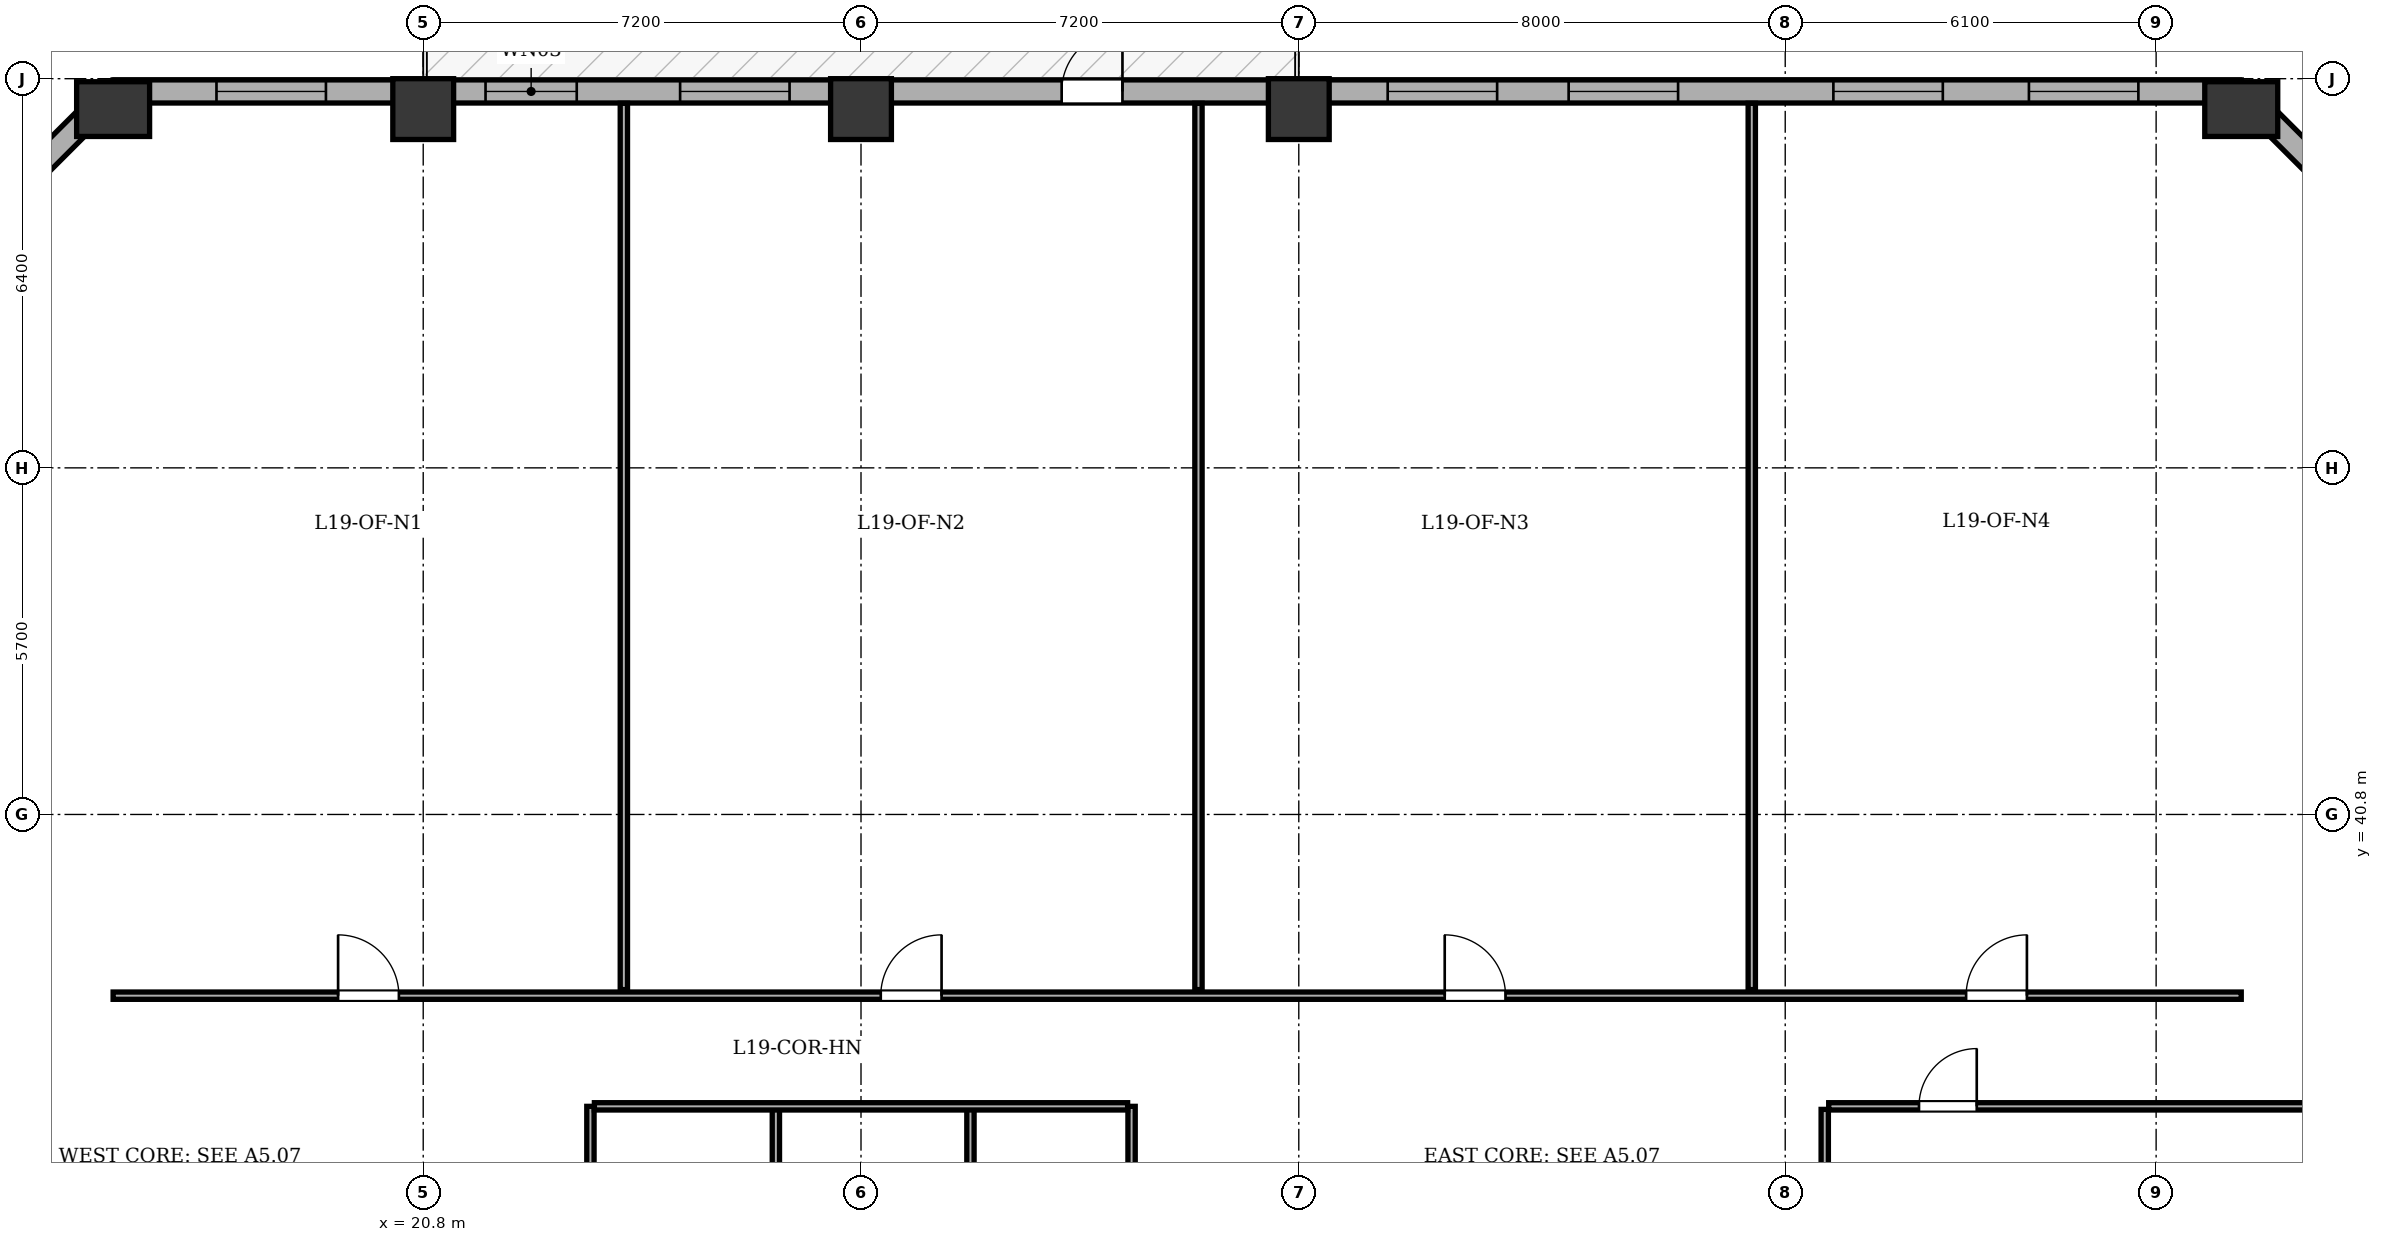
"""IFC4 building model, lengths in metres.
Left out: names, types, materials, properties, quantities, classifications, styles, units other than length and angle.
Written with IfcOpenShell. Run it as: python <this file> out.ifc"""

import sys

from ifc_helpers import new_model, si_unit, direction, frame, frame_2d, origin, origin_2d, place, context, subcontext, project, spatial, rectangle, extrude, element, fill, save


model = new_model("IFC4")
c1 = context("Model", 3, precision=1e-05, world=origin(), true_north=direction((0.0, 1.0)))
c2 = subcontext(c1, "Body", "Model", "MODEL_VIEW")
j1 = project(units=[si_unit("LENGTHUNIT", "METRE"), si_unit("PLANEANGLEUNIT", "RADIAN")], contexts=[c1])
p1 = place(None, origin())
s1 = spatial("IfcSite", under=j1, at=p1, CompositionType="ELEMENT")
p2 = place(p1, origin())
s2 = spatial("IfcBuilding", under=s1, at=p2, CompositionType="ELEMENT")
p3 = place(p2, frame((0.0, 0.0, 78.9)))
s3 = spatial("IfcBuildingStorey", under=s2, at=p3, CompositionType="ELEMENT", Elevation=78.9)
p4 = place(p3, frame((15.7, 52.4, 0.0), z_axis=(0.0, 0.0, 1.0), x_axis=(1.0, 0.0, 0.0)))
e1 = element("IfcColumn", 1, at=p4, inside=s3, PredefinedType="COLUMN", context=c2, shape_type="SweptSolid", body=[
    extrude(rectangle(XDim=0.9, YDim=1.2, at=origin_2d()), origin(), (0.0, 0.0, 1.0), 3.9),
])
for number, where, z_axis, x_axis in (
    (2, (20.8, 52.4, 0.0), (0.0, 0.0, 1.0), (1.0, 0.0, 0.0)),
    (3, (28.0, 52.4, 0.0), (0.0, 0.0, 1.0), (1.0, 0.0, 0.0)),
    (4, (35.2, 52.4, 0.0), (0.0, 0.0, 1.0), (1.0, 0.0, 0.0)),
):
    element("IfcColumn", number, at=place(p3, frame(where, z_axis=z_axis, x_axis=x_axis)), inside=s3, PredefinedType="COLUMN", context=c2, shape_type="SweptSolid", body=[
        extrude(rectangle(XDim=1.0, YDim=1.0, at=origin_2d()), origin(), (0.0, 0.0, 1.0), 3.9),
    ])
p5 = place(p3, frame((50.7, 52.4, 0.0), z_axis=(0.0, 0.0, 1.0), x_axis=(1.0, 0.0, 0.0)))
e5 = element("IfcColumn", 5, at=p5, inside=s3, PredefinedType="COLUMN", context=c2, shape_type="SweptSolid", body=[
    extrude(rectangle(XDim=0.9, YDim=1.2, at=origin_2d()), origin(), (0.0, 0.0, 1.0), 3.9),
])
p6 = place(p3, frame((10.91, 47.9, 0.0), z_axis=(0.0, 0.0, 1.0), x_axis=(0.707106781187, 0.707106781187, 0.0)))
e6 = element("IfcWall", 6, at=p6, inside=s3, PredefinedType="STANDARD", context=c2, shape_type="SweptSolid", body=[
    extrude(rectangle(XDim=6.774, YDim=0.38, at=frame_2d((3.387, 0.0))), origin(), (0.0, 0.0, 1.0), 3.135),
])
p7 = place(p6, frame((2.687, 0.0, 0.8)))
e7 = element("IfcOpeningElement", 7, at=p7, cuts=e6, PredefinedType="OPENING", context=c2, shape_type="SweptSolid", body=[
    extrude(rectangle(XDim=1.4, YDim=1.65, at=frame_2d((0.7, 0.825))), frame((0.0, 0.2, 0.0), z_axis=(0.0, -1.0, 0.0), x_axis=(1.0, 0.0, 0.0)), (0.0, 0.0, 1.0), 0.4),
])
p8 = place(p3, frame((15.7, 52.69, 0.0), z_axis=(0.0, 0.0, 1.0), x_axis=(1.0, 0.0, 0.0)))
e8 = element("IfcWall", 8, at=p8, inside=s3, PredefinedType="STANDARD", context=c2, shape_type="SweptSolid", body=[
    extrude(rectangle(XDim=35.0, YDim=0.38, at=frame_2d((17.5, 0.0))), origin(), (0.0, 0.0, 1.0), 3.135),
])
p9 = place(p8, frame((15.6, 0.0, 0.0)))
e9 = element("IfcOpeningElement", 9, at=p9, cuts=e8, PredefinedType="OPENING", context=c2, shape_type="SweptSolid", body=[
    extrude(rectangle(XDim=1.0, YDim=2.02, at=frame_2d((0.5, 1.01))), frame((0.0, 0.2, 0.0), z_axis=(0.0, -1.0, 0.0), x_axis=(1.0, 0.0, 0.0)), (0.0, 0.0, 1.0), 0.4),
])
p10 = place(p8, frame((1.7, 0.0, 0.8)))
e10 = element("IfcOpeningElement", 10, at=p10, cuts=e8, PredefinedType="OPENING", context=c2, shape_type="SweptSolid", body=[
    extrude(rectangle(XDim=1.8, YDim=1.9, at=frame_2d((0.9, 0.95))), frame((0.0, 0.2, 0.0), z_axis=(0.0, -1.0, 0.0), x_axis=(1.0, 0.0, 0.0)), (0.0, 0.0, 1.0), 0.4),
])
p11 = place(p8, frame((6.125, 0.0, 0.8)))
e11 = element("IfcOpeningElement", 11, at=p11, cuts=e8, PredefinedType="OPENING", context=c2, shape_type="SweptSolid", body=[
    extrude(rectangle(XDim=1.5, YDim=1.9, at=frame_2d((0.75, 0.95))), frame((0.0, 0.2, 0.0), z_axis=(0.0, -1.0, 0.0), x_axis=(1.0, 0.0, 0.0)), (0.0, 0.0, 1.0), 0.4),
])
p12 = place(p8, frame((9.325, 0.0, 0.8)))
e12 = element("IfcOpeningElement", 12, at=p12, cuts=e8, PredefinedType="OPENING", context=c2, shape_type="SweptSolid", body=[
    extrude(rectangle(XDim=1.8, YDim=1.9, at=frame_2d((0.9, 0.95))), frame((0.0, 0.2, 0.0), z_axis=(0.0, -1.0, 0.0), x_axis=(1.0, 0.0, 0.0)), (0.0, 0.0, 1.0), 0.4),
])
p13 = place(p8, frame((20.962, 0.0, 0.8)))
e13 = element("IfcOpeningElement", 13, at=p13, cuts=e8, PredefinedType="OPENING", context=c2, shape_type="SweptSolid", body=[
    extrude(rectangle(XDim=1.8, YDim=1.9, at=frame_2d((0.9, 0.95))), frame((0.0, 0.2, 0.0), z_axis=(0.0, -1.0, 0.0), x_axis=(1.0, 0.0, 0.0)), (0.0, 0.0, 1.0), 0.4),
])
p14 = place(p8, frame((23.938, 0.0, 0.8)))
e14 = element("IfcOpeningElement", 14, at=p14, cuts=e8, PredefinedType="OPENING", context=c2, shape_type="SweptSolid", body=[
    extrude(rectangle(XDim=1.8, YDim=1.9, at=frame_2d((0.9, 0.95))), frame((0.0, 0.2, 0.0), z_axis=(0.0, -1.0, 0.0), x_axis=(1.0, 0.0, 0.0)), (0.0, 0.0, 1.0), 0.4),
])
p15 = place(p8, frame((28.292, 0.0, 0.8)))
e15 = element("IfcOpeningElement", 15, at=p15, cuts=e8, PredefinedType="OPENING", context=c2, shape_type="SweptSolid", body=[
    extrude(rectangle(XDim=1.8, YDim=1.9, at=frame_2d((0.9, 0.95))), frame((0.0, 0.2, 0.0), z_axis=(0.0, -1.0, 0.0), x_axis=(1.0, 0.0, 0.0)), (0.0, 0.0, 1.0), 0.4),
])
p16 = place(p8, frame((31.508, 0.0, 0.8)))
e16 = element("IfcOpeningElement", 16, at=p16, cuts=e8, PredefinedType="OPENING", context=c2, shape_type="SweptSolid", body=[
    extrude(rectangle(XDim=1.8, YDim=1.9, at=frame_2d((0.9, 0.95))), frame((0.0, 0.2, 0.0), z_axis=(0.0, -1.0, 0.0), x_axis=(1.0, 0.0, 0.0)), (0.0, 0.0, 1.0), 0.4),
])
p17 = place(p3, frame((50.7, 52.69, 0.0), z_axis=(0.0, 0.0, 1.0), x_axis=(0.707106781187, -0.707106781187, 0.0)))
e17 = element("IfcWall", 17, at=p17, inside=s3, PredefinedType="STANDARD", context=c2, shape_type="SweptSolid", body=[
    extrude(rectangle(XDim=6.774, YDim=0.38, at=frame_2d((3.387, 0.0))), origin(), (0.0, 0.0, 1.0), 3.135),
])
p18 = place(p17, frame((2.687, 0.0, 0.8)))
e18 = element("IfcOpeningElement", 18, at=p18, cuts=e17, PredefinedType="OPENING", context=c2, shape_type="SweptSolid", body=[
    extrude(rectangle(XDim=1.4, YDim=1.65, at=frame_2d((0.7, 0.825))), frame((0.0, 0.2, 0.0), z_axis=(0.0, -1.0, 0.0), x_axis=(1.0, 0.0, 0.0)), (0.0, 0.0, 1.0), 0.4),
])
for number, where, z_axis, x_axis in (
    (19, (23.55, 24.715, 0.0), (0.0, 0.0, 1.0), (0.0, 1.0, 0.0)),
    (20, (32.45, 24.715, 0.0), (0.0, 0.0, 1.0), (0.0, 1.0, 0.0)),
    (21, (26.6, 24.715, 0.0), (0.0, 0.0, 1.0), (0.0, 1.0, 0.0)),
):
    element("IfcWall", number, at=place(p3, frame(where, z_axis=z_axis, x_axis=x_axis)), inside=s3, PredefinedType="PARTITIONING", context=c2, shape_type="SweptSolid", body=[
        extrude(rectangle(XDim=11.285, YDim=0.12, at=frame_2d((5.643, 0.0))), origin(), (0.0, 0.0, 1.0), 3.6),
    ])
p19 = place(p3, frame((29.8, 24.715, 0.0), z_axis=(0.0, 0.0, 1.0), x_axis=(0.0, 1.0, 0.0)))
e22 = element("IfcWall", 22, at=p19, inside=s3, PredefinedType="PARTITIONING", context=c2, shape_type="SweptSolid", body=[
    extrude(rectangle(XDim=11.285, YDim=0.12, at=frame_2d((5.643, 0.0))), origin(), (0.0, 0.0, 1.0), 3.135),
])
p20 = place(p3, frame((23.615, 36.0, 0.0), z_axis=(0.0, 0.0, 1.0), x_axis=(1.0, 0.0, 0.0)))
e23 = element("IfcWall", 23, at=p20, inside=s3, PredefinedType="PARTITIONING", context=c2, shape_type="SweptSolid", body=[
    extrude(rectangle(XDim=8.77, YDim=0.12, at=frame_2d((4.385, 0.0))), origin(), (0.0, 0.0, 1.0), 3.6),
])
p21 = place(p3, frame((15.7, 37.82, 0.0), z_axis=(0.0, 0.0, 1.0), x_axis=(1.0, 0.0, 0.0)))
e24 = element("IfcWall", 24, at=p21, inside=s3, PredefinedType="PARTITIONING", context=c2, shape_type="SweptSolid", body=[
    extrude(rectangle(XDim=35.0, YDim=0.12, at=frame_2d((17.5, 0.0))), origin(), (0.0, 0.0, 1.0), 3.6),
])
p22 = place(p21, frame((3.7, 0.0, 0.0)))
e25 = element("IfcOpeningElement", 25, at=p22, cuts=e24, PredefinedType="OPENING", context=c2, shape_type="SweptSolid", body=[
    extrude(rectangle(XDim=1.0, YDim=2.1, at=frame_2d((0.5, 1.05))), frame((0.0, 0.07, 0.0), z_axis=(0.0, -1.0, 0.0), x_axis=(1.0, 0.0, 0.0)), (0.0, 0.0, 1.0), 0.14),
])
p23 = place(p21, frame((12.625, 0.0, 0.0)))
e26 = element("IfcOpeningElement", 26, at=p23, cuts=e24, PredefinedType="OPENING", context=c2, shape_type="SweptSolid", body=[
    extrude(rectangle(XDim=1.0, YDim=2.1, at=frame_2d((0.5, 1.05))), frame((0.0, 0.07, 0.0), z_axis=(0.0, -1.0, 0.0), x_axis=(1.0, 0.0, 0.0)), (0.0, 0.0, 1.0), 0.14),
])
p24 = place(p21, frame((21.9, 0.0, 0.0)))
e27 = element("IfcOpeningElement", 27, at=p24, cuts=e24, PredefinedType="OPENING", context=c2, shape_type="SweptSolid", body=[
    extrude(rectangle(XDim=1.0, YDim=2.1, at=frame_2d((0.5, 1.05))), frame((0.0, 0.07, 0.0), z_axis=(0.0, -1.0, 0.0), x_axis=(1.0, 0.0, 0.0)), (0.0, 0.0, 1.0), 0.14),
])
p25 = place(p21, frame((30.475, 0.0, 0.0)))
e28 = element("IfcOpeningElement", 28, at=p25, cuts=e24, PredefinedType="OPENING", context=c2, shape_type="SweptSolid", body=[
    extrude(rectangle(XDim=1.0, YDim=2.1, at=frame_2d((0.5, 1.05))), frame((0.0, 0.07, 0.0), z_axis=(0.0, -1.0, 0.0), x_axis=(1.0, 0.0, 0.0)), (0.0, 0.0, 1.0), 0.14),
])
for number, where, z_axis, x_axis in (
    (29, (24.1, 37.92, 0.0), (0.0, 0.0, 1.0), (0.0, 1.0, 0.0)),
    (30, (33.55, 37.92, 0.0), (0.0, 0.0, 1.0), (0.0, 1.0, 0.0)),
):
    element("IfcWall", number, at=place(p3, frame(where, z_axis=z_axis, x_axis=x_axis)), inside=s3, PredefinedType="PARTITIONING", context=c2, shape_type="SweptSolid", body=[
        extrude(rectangle(XDim=14.575, YDim=0.12, at=frame_2d((7.288, 0.0))), origin(), (0.0, 0.0, 1.0), 3.135),
    ])
p26 = place(p3, frame((42.65, 37.92, 0.0), z_axis=(0.0, 0.0, 1.0), x_axis=(0.0, 1.0, 0.0)))
e31 = element("IfcWall", 31, at=p26, inside=s3, PredefinedType="PARTITIONING", context=c2, shape_type="SweptSolid", body=[
    extrude(rectangle(XDim=14.575, YDim=0.12, at=frame_2d((7.288, 0.0))), origin(), (0.0, 0.0, 1.0), 3.6),
])
p27 = place(p3, frame((43.85, 18.45, 0.0), z_axis=(0.0, 0.0, 1.0), x_axis=(0.0, 1.0, 0.0)))
e32 = element("IfcWall", 32, at=p27, inside=s3, PredefinedType="PARTITIONING", context=c2, shape_type="SweptSolid", body=[
    extrude(rectangle(XDim=17.5, YDim=0.12, at=frame_2d((8.75, 0.0))), origin(), (0.0, 0.0, 1.0), 3.6),
])
p28 = place(p3, frame((43.915, 36.0, 0.0), z_axis=(0.0, 0.0, 1.0), x_axis=(1.0, 0.0, 0.0)))
e33 = element("IfcWall", 33, at=p28, inside=s3, PredefinedType="PARTITIONING", context=c2, shape_type="SweptSolid", body=[
    extrude(rectangle(XDim=11.38, YDim=0.12, at=frame_2d((5.69, 0.0))), origin(), (0.0, 0.0, 1.0), 3.6),
])
p29 = place(p28, frame((1.485, 0.0, 0.0)))
e34 = element("IfcOpeningElement", 34, at=p29, cuts=e33, PredefinedType="OPENING", context=c2, shape_type="SweptSolid", body=[
    extrude(rectangle(XDim=0.95, YDim=2.1, at=frame_2d((0.475, 1.05))), frame((0.0, 0.07, 0.0), z_axis=(0.0, -1.0, 0.0), x_axis=(1.0, 0.0, 0.0)), (0.0, 0.0, 1.0), 0.14),
])
p30 = place(p9, origin())
e35 = element("IfcDoor", 35, at=p30, inside=s3, OperationType="SINGLE_SWING_RIGHT", PredefinedType="DOOR", context=c2, shape_type="SweptSolid", body=[
    extrude(rectangle(XDim=1.0, YDim=2.02, at=frame_2d((0.5, 1.01))), frame((0.0, 0.025, 0.0), z_axis=(0.0, -1.0, 0.0), x_axis=(1.0, 0.0, 0.0)), (0.0, 0.0, 1.0), 0.05),
])
fill(e9, e35)
p31 = place(p10, origin())
e36 = element("IfcWindow", 36, at=p31, inside=s3, PartitioningType="SINGLE_PANEL", PredefinedType="WINDOW", context=c2, shape_type="SweptSolid", body=[
    extrude(rectangle(XDim=1.8, YDim=1.9, at=frame_2d((0.9, 0.95))), frame((0.0, -0.01, 0.0), z_axis=(0.0, -1.0, 0.0), x_axis=(1.0, 0.0, 0.0)), (0.0, 0.0, 1.0), 0.06),
])
fill(e10, e36)
p32 = place(p11, origin())
e37 = element("IfcWindow", 37, at=p32, inside=s3, PartitioningType="SINGLE_PANEL", PredefinedType="WINDOW", context=c2, shape_type="SweptSolid", body=[
    extrude(rectangle(XDim=1.5, YDim=1.9, at=frame_2d((0.75, 0.95))), frame((0.0, -0.01, 0.0), z_axis=(0.0, -1.0, 0.0), x_axis=(1.0, 0.0, 0.0)), (0.0, 0.0, 1.0), 0.06),
])
fill(e11, e37)
p33 = place(p12, origin())
e38 = element("IfcWindow", 38, at=p33, inside=s3, PartitioningType="SINGLE_PANEL", PredefinedType="WINDOW", context=c2, shape_type="SweptSolid", body=[
    extrude(rectangle(XDim=1.8, YDim=1.9, at=frame_2d((0.9, 0.95))), frame((0.0, -0.01, 0.0), z_axis=(0.0, -1.0, 0.0), x_axis=(1.0, 0.0, 0.0)), (0.0, 0.0, 1.0), 0.06),
])
fill(e12, e38)
p34 = place(p13, origin())
e39 = element("IfcWindow", 39, at=p34, inside=s3, PartitioningType="SINGLE_PANEL", PredefinedType="WINDOW", context=c2, shape_type="SweptSolid", body=[
    extrude(rectangle(XDim=1.8, YDim=1.9, at=frame_2d((0.9, 0.95))), frame((0.0, -0.01, 0.0), z_axis=(0.0, -1.0, 0.0), x_axis=(1.0, 0.0, 0.0)), (0.0, 0.0, 1.0), 0.06),
])
fill(e13, e39)
p35 = place(p14, origin())
e40 = element("IfcWindow", 40, at=p35, inside=s3, PartitioningType="SINGLE_PANEL", PredefinedType="WINDOW", context=c2, shape_type="SweptSolid", body=[
    extrude(rectangle(XDim=1.8, YDim=1.9, at=frame_2d((0.9, 0.95))), frame((0.0, -0.01, 0.0), z_axis=(0.0, -1.0, 0.0), x_axis=(1.0, 0.0, 0.0)), (0.0, 0.0, 1.0), 0.06),
])
fill(e14, e40)
p36 = place(p15, origin())
e41 = element("IfcWindow", 41, at=p36, inside=s3, PartitioningType="SINGLE_PANEL", PredefinedType="WINDOW", context=c2, shape_type="SweptSolid", body=[
    extrude(rectangle(XDim=1.8, YDim=1.9, at=frame_2d((0.9, 0.95))), frame((0.0, -0.01, 0.0), z_axis=(0.0, -1.0, 0.0), x_axis=(1.0, 0.0, 0.0)), (0.0, 0.0, 1.0), 0.06),
])
fill(e15, e41)
p37 = place(p16, origin())
e42 = element("IfcWindow", 42, at=p37, inside=s3, PartitioningType="SINGLE_PANEL", PredefinedType="WINDOW", context=c2, shape_type="SweptSolid", body=[
    extrude(rectangle(XDim=1.8, YDim=1.9, at=frame_2d((0.9, 0.95))), frame((0.0, -0.01, 0.0), z_axis=(0.0, -1.0, 0.0), x_axis=(1.0, 0.0, 0.0)), (0.0, 0.0, 1.0), 0.06),
])
fill(e16, e42)
p38 = place(p22, origin())
e43 = element("IfcDoor", 43, at=p38, inside=s3, OperationType="SINGLE_SWING_LEFT", PredefinedType="DOOR", context=c2, shape_type="SweptSolid", body=[
    extrude(rectangle(XDim=1.0, YDim=2.1, at=frame_2d((0.5, 1.05))), frame((0.0, 0.025, 0.0), z_axis=(0.0, -1.0, 0.0), x_axis=(1.0, 0.0, 0.0)), (0.0, 0.0, 1.0), 0.05),
])
fill(e25, e43)
p39 = place(p23, origin())
e44 = element("IfcDoor", 44, at=p39, inside=s3, OperationType="SINGLE_SWING_RIGHT", PredefinedType="DOOR", context=c2, shape_type="SweptSolid", body=[
    extrude(rectangle(XDim=1.0, YDim=2.1, at=frame_2d((0.5, 1.05))), frame((0.0, 0.025, 0.0), z_axis=(0.0, -1.0, 0.0), x_axis=(1.0, 0.0, 0.0)), (0.0, 0.0, 1.0), 0.05),
])
fill(e26, e44)
p40 = place(p24, origin())
e45 = element("IfcDoor", 45, at=p40, inside=s3, OperationType="SINGLE_SWING_LEFT", PredefinedType="DOOR", context=c2, shape_type="SweptSolid", body=[
    extrude(rectangle(XDim=1.0, YDim=2.1, at=frame_2d((0.5, 1.05))), frame((0.0, 0.025, 0.0), z_axis=(0.0, -1.0, 0.0), x_axis=(1.0, 0.0, 0.0)), (0.0, 0.0, 1.0), 0.05),
])
fill(e27, e45)
p41 = place(p25, origin())
e46 = element("IfcDoor", 46, at=p41, inside=s3, OperationType="SINGLE_SWING_RIGHT", PredefinedType="DOOR", context=c2, shape_type="SweptSolid", body=[
    extrude(rectangle(XDim=1.0, YDim=2.1, at=frame_2d((0.5, 1.05))), frame((0.0, 0.025, 0.0), z_axis=(0.0, -1.0, 0.0), x_axis=(1.0, 0.0, 0.0)), (0.0, 0.0, 1.0), 0.05),
])
fill(e28, e46)
p42 = place(p29, origin())
e47 = element("IfcDoor", 47, at=p42, inside=s3, OperationType="SINGLE_SWING_RIGHT", PredefinedType="DOOR", context=c2, shape_type="SweptSolid", body=[
    extrude(rectangle(XDim=0.95, YDim=2.1, at=frame_2d((0.475, 1.05))), frame((0.0, 0.025, 0.0), z_axis=(0.0, -1.0, 0.0), x_axis=(1.0, 0.0, 0.0)), (0.0, 0.0, 1.0), 0.05),
])
fill(e34, e47)
save(model, sys.argv[1])
